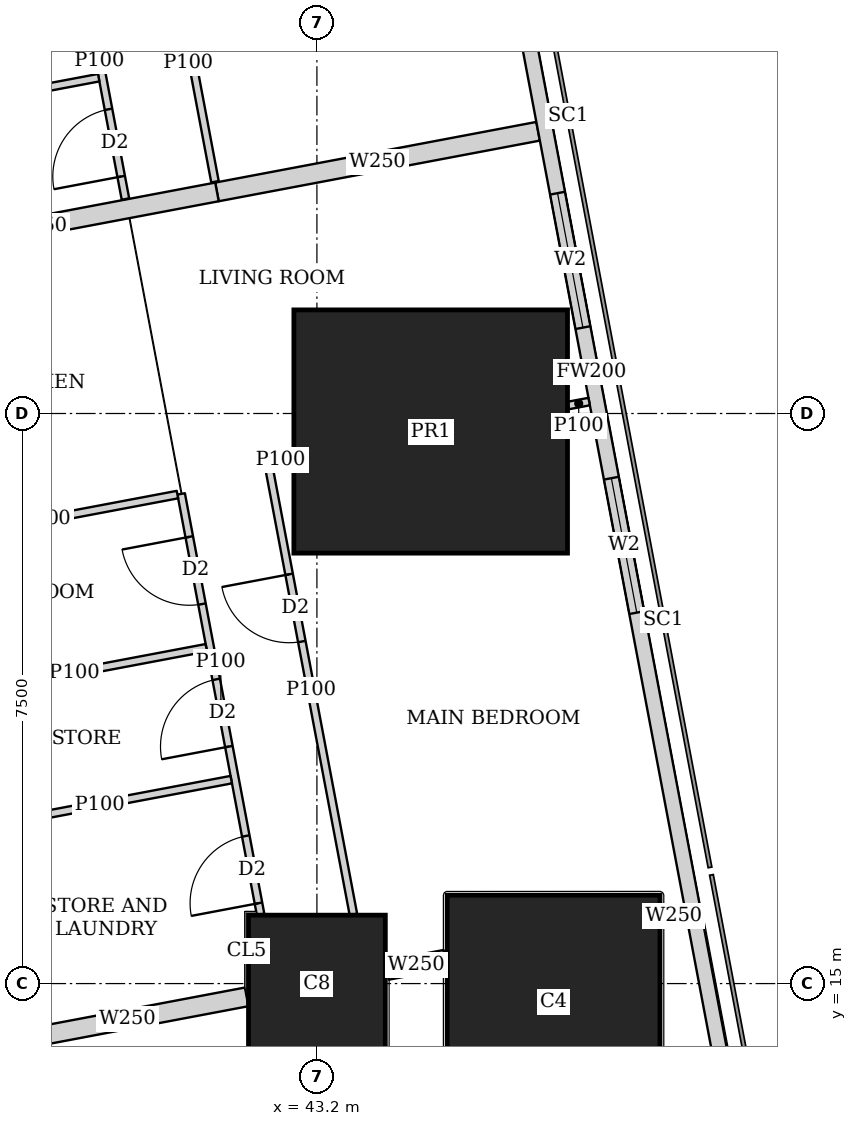
"""IFC4 building model, lengths in metres.
Left out: names, types, materials, properties, quantities, classifications, styles, units other than length and angle.
Written with IfcOpenShell. Run it as: python <this file> out.ifc"""

import sys

from ifc_helpers import new_model, si_unit, direction, frame, frame_2d, origin, origin_2d, place, context, subcontext, project, spatial, rectangle, extrude, element, fill, save


model = new_model("IFC4")
c1 = context("Model", 3, precision=1e-05, world=origin(), true_north=direction((0.0, 1.0)))
c2 = subcontext(c1, "Body", "Model", "MODEL_VIEW")
j1 = project(units=[si_unit("LENGTHUNIT", "METRE"), si_unit("PLANEANGLEUNIT", "RADIAN")], contexts=[c1])
p1 = place(None, origin())
s1 = spatial("IfcSite", under=j1, at=p1, CompositionType="ELEMENT")
p2 = place(p1, origin())
s2 = spatial("IfcBuilding", under=s1, at=p2, CompositionType="ELEMENT")
p3 = place(p2, frame((0.0, 0.0, 42.5)))
s3 = spatial("IfcBuildingStorey", under=s2, at=p3, CompositionType="ELEMENT", Elevation=42.5)
p4 = place(p3, frame((43.2, 15.0, 0.0), z_axis=(0.0, 0.0, 1.0), x_axis=(1.0, 0.0, 0.0)))
e1 = element("IfcColumn", 1, at=p4, inside=s3, PredefinedType="COLUMN", context=c2, shape_type="SweptSolid", body=[
    extrude(rectangle(XDim=1.8, YDim=1.8, at=origin_2d()), origin(), (0.0, 0.0, 1.0), 3.75),
])
p5 = place(p3, frame((46.314, 14.763, 0.0), z_axis=(0.0, 0.0, 1.0), x_axis=(1.0, 0.0, 0.0)))
e2 = element("IfcColumn", 2, at=p5, inside=s3, PredefinedType="COLUMN", context=c2, shape_type="SweptSolid", body=[
    extrude(rectangle(XDim=2.8, YDim=2.8, at=origin_2d()), origin(), (0.0, 0.0, 1.0), 3.75),
])
p6 = place(p3, frame((44.697, 22.263, 0.0), z_axis=(0.0, 0.0, 1.0), x_axis=(1.0, 0.0, 0.0)))
e3 = element("IfcColumn", 3, at=p6, inside=s3, PredefinedType="COLUMN", context=c2, shape_type="SweptSolid", body=[
    extrude(rectangle(XDim=3.6, YDim=3.2, at=origin_2d()), origin(), (0.0, 0.0, 1.0), 3.75),
])
p7 = place(p3, frame((50.653, 2.703, 0.0), z_axis=(0.0, 0.0, 1.0), x_axis=(-0.185612026696, 0.982623109613, 0.0)))
e4 = element("IfcWall", 4, at=p7, inside=s3, PredefinedType="SOLIDWALL", context=c2, shape_type="SweptSolid", body=[
    extrude(rectangle(XDim=41.393, YDim=0.2, at=frame_2d((20.697, 0.0))), origin(), (0.0, 0.0, 1.0), 3.5),
])
p8 = place(p7, frame((1.633, 0.0, 0.9)))
e5 = element("IfcOpeningElement", 5, at=p8, cuts=e4, PredefinedType="OPENING", context=c2, shape_type="SweptSolid", body=[
    extrude(rectangle(XDim=1.8, YDim=1.5, at=frame_2d((0.9, 0.75))), frame((0.0, 0.11, 0.0), z_axis=(0.0, -1.0, 0.0), x_axis=(1.0, 0.0, 0.0)), (0.0, 0.0, 1.0), 0.22),
])
p9 = place(p7, frame((6.032, 0.0, 0.9)))
e6 = element("IfcOpeningElement", 6, at=p9, cuts=e4, PredefinedType="OPENING", context=c2, shape_type="SweptSolid", body=[
    extrude(rectangle(XDim=1.8, YDim=1.5, at=frame_2d((0.9, 0.75))), frame((0.0, 0.11, 0.0), z_axis=(0.0, -1.0, 0.0), x_axis=(1.0, 0.0, 0.0)), (0.0, 0.0, 1.0), 0.22),
])
p10 = place(p7, frame((9.848, 0.0, 0.9)))
e7 = element("IfcOpeningElement", 7, at=p10, cuts=e4, PredefinedType="OPENING", context=c2, shape_type="SweptSolid", body=[
    extrude(rectangle(XDim=1.8, YDim=1.5, at=frame_2d((0.9, 0.75))), frame((0.0, 0.11, 0.0), z_axis=(0.0, -1.0, 0.0), x_axis=(1.0, 0.0, 0.0)), (0.0, 0.0, 1.0), 0.22),
])
p11 = place(p7, frame((17.481, 0.0, 0.9)))
e8 = element("IfcOpeningElement", 8, at=p11, cuts=e4, PredefinedType="OPENING", context=c2, shape_type="SweptSolid", body=[
    extrude(rectangle(XDim=1.8, YDim=1.5, at=frame_2d((0.9, 0.75))), frame((0.0, 0.11, 0.0), z_axis=(0.0, -1.0, 0.0), x_axis=(1.0, 0.0, 0.0)), (0.0, 0.0, 1.0), 0.22),
])
p12 = place(p7, frame((21.297, 0.0, 0.9)))
e9 = element("IfcOpeningElement", 9, at=p12, cuts=e4, PredefinedType="OPENING", context=c2, shape_type="SweptSolid", body=[
    extrude(rectangle(XDim=1.8, YDim=1.5, at=frame_2d((0.9, 0.75))), frame((0.0, 0.11, 0.0), z_axis=(0.0, -1.0, 0.0), x_axis=(1.0, 0.0, 0.0)), (0.0, 0.0, 1.0), 0.22),
])
p13 = place(p7, frame((25.113, 0.0, 0.9)))
e10 = element("IfcOpeningElement", 10, at=p13, cuts=e4, PredefinedType="OPENING", context=c2, shape_type="SweptSolid", body=[
    extrude(rectangle(XDim=1.8, YDim=1.5, at=frame_2d((0.9, 0.75))), frame((0.0, 0.11, 0.0), z_axis=(0.0, -1.0, 0.0), x_axis=(1.0, 0.0, 0.0)), (0.0, 0.0, 1.0), 0.22),
])
p14 = place(p7, frame((28.93, 0.0, 0.9)))
e11 = element("IfcOpeningElement", 11, at=p14, cuts=e4, PredefinedType="OPENING", context=c2, shape_type="SweptSolid", body=[
    extrude(rectangle(XDim=1.8, YDim=1.5, at=frame_2d((0.9, 0.75))), frame((0.0, 0.11, 0.0), z_axis=(0.0, -1.0, 0.0), x_axis=(1.0, 0.0, 0.0)), (0.0, 0.0, 1.0), 0.22),
])
p15 = place(p7, frame((32.746, 0.0, 0.9)))
e12 = element("IfcOpeningElement", 12, at=p15, cuts=e4, PredefinedType="OPENING", context=c2, shape_type="SweptSolid", body=[
    extrude(rectangle(XDim=1.8, YDim=1.5, at=frame_2d((0.9, 0.75))), frame((0.0, 0.11, 0.0), z_axis=(0.0, -1.0, 0.0), x_axis=(1.0, 0.0, 0.0)), (0.0, 0.0, 1.0), 0.22),
])
p16 = place(p7, frame((36.481, 0.0, 0.9)))
e13 = element("IfcOpeningElement", 13, at=p16, cuts=e4, PredefinedType="OPENING", context=c2, shape_type="SweptSolid", body=[
    extrude(rectangle(XDim=1.8, YDim=1.5, at=frame_2d((0.9, 0.75))), frame((0.0, 0.11, 0.0), z_axis=(0.0, -1.0, 0.0), x_axis=(1.0, 0.0, 0.0)), (0.0, 0.0, 1.0), 0.22),
])
p17 = place(p3, frame((33.68, 42.723, 0.0), z_axis=(0.0, 0.0, 1.0), x_axis=(0.185624129307, -0.98262082342, 0.0)))
e14 = element("IfcWall", 14, at=p17, inside=s3, PredefinedType="SOLIDWALL", context=c2, shape_type="SweptSolid", body=[
    extrude(rectangle(XDim=41.051, YDim=0.15, at=frame_2d((20.526, 0.0))), origin(), (0.0, 0.0, 1.0), 2.5),
])
p18 = place(p17, frame((7.73, 0.0, 0.0)))
e15 = element("IfcOpeningElement", 15, at=p18, cuts=e14, PredefinedType="OPENING", context=c2, shape_type="SweptSolid", body=[
    extrude(rectangle(XDim=1.0, YDim=2.1, at=frame_2d((0.5, 1.05))), frame((0.0, 0.085, 0.0), z_axis=(0.0, -1.0, 0.0), x_axis=(1.0, 0.0, 0.0)), (0.0, 0.0, 1.0), 0.17),
])
p19 = place(p17, frame((12.307, 0.0, 0.0)))
e16 = element("IfcOpeningElement", 16, at=p19, cuts=e14, PredefinedType="OPENING", context=c2, shape_type="SweptSolid", body=[
    extrude(rectangle(XDim=1.0, YDim=2.1, at=frame_2d((0.5, 1.05))), frame((0.0, 0.085, 0.0), z_axis=(0.0, -1.0, 0.0), x_axis=(1.0, 0.0, 0.0)), (0.0, 0.0, 1.0), 0.17),
])
p20 = place(p17, frame((19.938, 0.0, 0.0)))
e17 = element("IfcOpeningElement", 17, at=p20, cuts=e14, PredefinedType="OPENING", context=c2, shape_type="SweptSolid", body=[
    extrude(rectangle(XDim=1.0, YDim=2.1, at=frame_2d((0.5, 1.05))), frame((0.0, 0.085, 0.0), z_axis=(0.0, -1.0, 0.0), x_axis=(1.0, 0.0, 0.0)), (0.0, 0.0, 1.0), 0.17),
])
p21 = place(p17, frame((32.193, 0.0, 0.0)))
e18 = element("IfcOpeningElement", 18, at=p21, cuts=e14, PredefinedType="OPENING", context=c2, shape_type="SweptSolid", body=[
    extrude(rectangle(XDim=1.0, YDim=2.1, at=frame_2d((0.5, 1.05))), frame((0.0, 0.085, 0.0), z_axis=(0.0, -1.0, 0.0), x_axis=(1.0, 0.0, 0.0)), (0.0, 0.0, 1.0), 0.17),
])
p22 = place(p3, frame((41.156, 29.273, 0.0), z_axis=(0.0, 0.0, 1.0), x_axis=(0.185474762472, -0.982649028131, 0.0)))
e19 = element("IfcWall", 19, at=p22, inside=s3, PredefinedType="PARTITIONING", context=c2, shape_type="SweptSolid", body=[
    extrude(rectangle(XDim=3.79, YDim=0.1, at=frame_2d((1.895, 0.0))), origin(), (0.0, 0.0, 1.0), 2.5),
])
p23 = place(p22, frame((1.2, 0.0, 0.0)))
e20 = element("IfcOpeningElement", 20, at=p23, cuts=e19, PredefinedType="OPENING", context=c2, shape_type="SweptSolid", body=[
    extrude(rectangle(XDim=0.9, YDim=2.1, at=frame_2d((0.45, 1.05))), frame((0.0, 0.06, 0.0), z_axis=(0.0, -1.0, 0.0), x_axis=(1.0, 0.0, 0.0)), (0.0, 0.0, 1.0), 0.12),
])
p24 = place(p3, frame((39.997, 28.942, 0.0), z_axis=(0.0, 0.0, 1.0), x_axis=(0.185580474845, -0.982629069057, 0.0)))
e21 = element("IfcWall", 21, at=p24, inside=s3, PredefinedType="PARTITIONING", context=c2, shape_type="SweptSolid", body=[
    extrude(rectangle(XDim=3.685, YDim=0.1, at=frame_2d((1.842, 0.0))), origin(), (0.0, 0.0, 1.0), 3.5),
])
p25 = place(p24, frame((0.576, 0.0, 0.0)))
e22 = element("IfcOpeningElement", 22, at=p25, cuts=e21, PredefinedType="OPENING", context=c2, shape_type="SweptSolid", body=[
    extrude(rectangle(XDim=0.9, YDim=2.1, at=frame_2d((0.45, 1.05))), frame((0.0, 0.06, 0.0), z_axis=(0.0, -1.0, 0.0), x_axis=(1.0, 0.0, 0.0)), (0.0, 0.0, 1.0), 0.12),
])
p26 = place(p24, frame((2.483, 0.0, 0.0)))
e23 = element("IfcOpeningElement", 23, at=p26, cuts=e21, PredefinedType="OPENING", context=c2, shape_type="SweptSolid", body=[
    extrude(rectangle(XDim=0.9, YDim=2.1, at=frame_2d((0.45, 1.05))), frame((0.0, 0.06, 0.0), z_axis=(0.0, -1.0, 0.0), x_axis=(1.0, 0.0, 0.0)), (0.0, 0.0, 1.0), 0.12),
])
p27 = place(p3, frame((40.329, 26.918, 0.0), z_axis=(0.0, 0.0, 1.0), x_axis=(-0.982638553676, -0.185530247748, 0.0)))
e24 = element("IfcWall", 24, at=p27, inside=s3, PredefinedType="PARTITIONING", context=c2, shape_type="SweptSolid", body=[
    extrude(rectangle(XDim=3.525, YDim=0.1, at=frame_2d((1.763, 0.0))), origin(), (0.0, 0.0, 1.0), 3.5),
])
p28 = place(p3, frame((42.565, 21.809, 0.0), z_axis=(0.0, 0.0, 1.0), x_axis=(0.185719768524, -0.982602751665, 0.0)))
e25 = element("IfcWall", 25, at=p28, inside=s3, PredefinedType="PARTITIONING", context=c2, shape_type="SweptSolid", body=[
    extrude(rectangle(XDim=6.004, YDim=0.1, at=frame_2d((3.002, 0.0))), origin(), (0.0, 0.0, 1.0), 2.5),
])
p29 = place(p28, frame((1.45, 0.0, 0.0)))
e26 = element("IfcOpeningElement", 26, at=p29, cuts=e25, PredefinedType="OPENING", context=c2, shape_type="SweptSolid", body=[
    extrude(rectangle(XDim=0.9, YDim=2.1, at=frame_2d((0.45, 1.05))), frame((0.0, 0.06, 0.0), z_axis=(0.0, -1.0, 0.0), x_axis=(1.0, 0.0, 0.0)), (0.0, 0.0, 1.0), 0.12),
])
p30 = place(p3, frame((41.414, 21.442, 0.0), z_axis=(0.0, 0.0, 1.0), x_axis=(0.185605379031, -0.982624365297, 0.0)))
e27 = element("IfcWall", 27, at=p30, inside=s3, PredefinedType="PARTITIONING", context=c2, shape_type="SweptSolid", body=[
    extrude(rectangle(XDim=5.63, YDim=0.1, at=frame_2d((2.815, 0.0))), origin(), (0.0, 0.0, 1.0), 3.5),
])
p31 = place(p30, frame((0.575, 0.0, 0.0)))
e28 = element("IfcOpeningElement", 28, at=p31, cuts=e27, PredefinedType="OPENING", context=c2, shape_type="SweptSolid", body=[
    extrude(rectangle(XDim=0.9, YDim=2.1, at=frame_2d((0.45, 1.05))), frame((0.0, 0.06, 0.0), z_axis=(0.0, -1.0, 0.0), x_axis=(1.0, 0.0, 0.0)), (0.0, 0.0, 1.0), 0.12),
])
p32 = place(p30, frame((4.58, 0.0, 0.0)))
e29 = element("IfcOpeningElement", 29, at=p32, cuts=e27, PredefinedType="OPENING", context=c2, shape_type="SweptSolid", body=[
    extrude(rectangle(XDim=0.9, YDim=2.1, at=frame_2d((0.45, 1.05))), frame((0.0, 0.06, 0.0), z_axis=(0.0, -1.0, 0.0), x_axis=(1.0, 0.0, 0.0)), (0.0, 0.0, 1.0), 0.12),
])
p33 = place(p30, frame((2.483, 0.0, 0.0)))
e30 = element("IfcOpeningElement", 30, at=p33, cuts=e27, PredefinedType="OPENING", context=c2, shape_type="SweptSolid", body=[
    extrude(rectangle(XDim=0.9, YDim=2.1, at=frame_2d((0.45, 1.05))), frame((0.0, 0.06, 0.0), z_axis=(0.0, -1.0, 0.0), x_axis=(1.0, 0.0, 0.0)), (0.0, 0.0, 1.0), 0.12),
])
p34 = place(p3, frame((46.782, 22.657, 0.0), z_axis=(0.0, 0.0, 1.0), x_axis=(-0.982574553168, -0.185868898601, 0.0)))
e31 = element("IfcWall", 31, at=p34, inside=s3, PredefinedType="PARTITIONING", context=c2, shape_type="SweptSolid", body=[
    extrude(rectangle(XDim=0.28, YDim=0.1, at=frame_2d((0.14, 0.0))), origin(), (0.0, 0.0, 1.0), 3.5),
])
p35 = place(p3, frame((42.887, 21.921, 0.0), z_axis=(0.0, 0.0, 1.0), x_axis=(-0.982274918032, -0.187445953293, 0.0)))
e32 = element("IfcWall", 32, at=p35, inside=s3, PredefinedType="PARTITIONING", context=c2, shape_type="SweptSolid", body=[
    extrude(rectangle(XDim=0.336, YDim=0.1, at=frame_2d((0.168, 0.0))), origin(), (0.0, 0.0, 1.0), 2.5),
])
p36 = place(p3, frame((41.365, 21.433, 0.0), z_axis=(0.0, 0.0, 1.0), x_axis=(-0.982638553676, -0.185530247748, 0.0)))
e33 = element("IfcWall", 33, at=p36, inside=s3, PredefinedType="PARTITIONING", context=c2, shape_type="SweptSolid", body=[
    extrude(rectangle(XDim=3.525, YDim=0.1, at=frame_2d((1.763, 0.0))), origin(), (0.0, 0.0, 1.0), 3.5),
])
p37 = place(p3, frame((42.073, 17.683, 0.0), z_axis=(0.0, 0.0, 1.0), x_axis=(-0.982626628545, -0.185593396635, 0.0)))
e34 = element("IfcWall", 34, at=p37, inside=s3, PredefinedType="PARTITIONING", context=c2, shape_type="SweptSolid", body=[
    extrude(rectangle(XDim=3.524, YDim=0.1, at=frame_2d((1.762, 0.0))), origin(), (0.0, 0.0, 1.0), 3.5),
])
p38 = place(p3, frame((41.745, 19.418, 0.0), z_axis=(0.0, 0.0, 1.0), x_axis=(-0.982629014545, -0.18558076348, 0.0)))
e35 = element("IfcWall", 35, at=p38, inside=s3, PredefinedType="PARTITIONING", context=c2, shape_type="SweptSolid", body=[
    extrude(rectangle(XDim=3.524, YDim=0.1, at=frame_2d((1.762, 0.0))), origin(), (0.0, 0.0, 1.0), 3.5),
])
p39 = place(p3, frame((46.11, 26.213, 0.0), z_axis=(0.0, 0.0, 1.0), x_axis=(-0.982633535512, -0.185556823879, 0.0)))
e36 = element("IfcWall", 36, at=p39, inside=s3, PredefinedType="SOLIDWALL", context=c2, shape_type="SweptSolid", body=[
    extrude(rectangle(XDim=4.3, YDim=0.25, at=frame_2d((2.15, 0.0))), origin(), (0.0, 0.0, 1.0), 2.05),
])
p40 = place(p3, frame((41.885, 25.415, 0.0), z_axis=(0.0, 0.0, 1.0), x_axis=(-0.982596737686, -0.185751584349, 0.0)))
e37 = element("IfcWall", 37, at=p40, inside=s3, PredefinedType="SOLIDWALL", context=c2, shape_type="SweptSolid", body=[
    extrude(rectangle(XDim=4.775, YDim=0.25, at=frame_2d((2.387, 0.0))), origin(), (0.0, 0.0, 1.0), 3.5),
])
p41 = place(p3, frame((48.055, 15.917, 0.0), z_axis=(0.0, 0.0, 1.0), x_axis=(-0.982510408223, -0.186207673669, 0.0)))
e38 = element("IfcWall", 38, at=p41, inside=s3, PredefinedType="SOLIDWALL", context=c2, shape_type="SweptSolid", body=[
    extrude(rectangle(XDim=0.323, YDim=0.25, at=frame_2d((0.161, 0.0))), origin(), (0.0, 0.0, 1.0), 3.5),
])
p42 = place(p3, frame((44.89, 15.319, 0.0), z_axis=(0.0, 0.0, 1.0), x_axis=(-0.982540856152, -0.186046945666, 0.0)))
e39 = element("IfcWall", 39, at=p42, inside=s3, PredefinedType="SOLIDWALL", context=c2, shape_type="SweptSolid", body=[
    extrude(rectangle(XDim=0.78, YDim=0.25, at=frame_2d((0.39, 0.0))), origin(), (0.0, 0.0, 1.0), 2.05),
])
p43 = place(p3, frame((42.276, 14.825, 0.0), z_axis=(0.0, 0.0, 1.0), x_axis=(-0.982607211054, -0.185696173318, 0.0)))
e40 = element("IfcWall", 40, at=p43, inside=s3, PredefinedType="SOLIDWALL", context=c2, shape_type="SweptSolid", body=[
    extrude(rectangle(XDim=3.194, YDim=0.25, at=frame_2d((1.597, 0.0))), origin(), (0.0, 0.0, 1.0), 3.5),
])
p44 = place(p11, origin())
e41 = element("IfcWindow", 41, at=p44, inside=s3, PartitioningType="SINGLE_PANEL", PredefinedType="WINDOW", context=c2, shape_type="SweptSolid", body=[
    extrude(rectangle(XDim=1.8, YDim=1.5, at=frame_2d((0.9, 0.75))), frame((0.0, 0.03, 0.0), z_axis=(0.0, -1.0, 0.0), x_axis=(1.0, 0.0, 0.0)), (0.0, 0.0, 1.0), 0.06),
])
fill(e8, e41)
p45 = place(p12, origin())
e42 = element("IfcWindow", 42, at=p45, inside=s3, PartitioningType="SINGLE_PANEL", PredefinedType="WINDOW", context=c2, shape_type="SweptSolid", body=[
    extrude(rectangle(XDim=1.8, YDim=1.5, at=frame_2d((0.9, 0.75))), frame((0.0, 0.03, 0.0), z_axis=(0.0, -1.0, 0.0), x_axis=(1.0, 0.0, 0.0)), (0.0, 0.0, 1.0), 0.06),
])
fill(e9, e42)
p46 = place(p23, origin())
e43 = element("IfcDoor", 43, at=p46, inside=s3, OperationType="SINGLE_SWING_LEFT", PredefinedType="DOOR", context=c2, shape_type="SweptSolid", body=[
    extrude(rectangle(XDim=0.9, YDim=2.1, at=frame_2d((0.45, 1.05))), frame((0.0, 0.025, 0.0), z_axis=(0.0, -1.0, 0.0), x_axis=(1.0, 0.0, 0.0)), (0.0, 0.0, 1.0), 0.05),
])
fill(e20, e43)
p47 = place(p26, origin())
e44 = element("IfcDoor", 44, at=p47, inside=s3, OperationType="SINGLE_SWING_LEFT", PredefinedType="DOOR", context=c2, shape_type="SweptSolid", body=[
    extrude(rectangle(XDim=0.9, YDim=2.1, at=frame_2d((0.45, 1.05))), frame((0.0, 0.025, 0.0), z_axis=(0.0, -1.0, 0.0), x_axis=(1.0, 0.0, 0.0)), (0.0, 0.0, 1.0), 0.05),
])
fill(e23, e44)
p48 = place(p29, origin())
e45 = element("IfcDoor", 45, at=p48, inside=s3, OperationType="SINGLE_SWING_RIGHT", PredefinedType="DOOR", context=c2, shape_type="SweptSolid", body=[
    extrude(rectangle(XDim=0.9, YDim=2.1, at=frame_2d((0.45, 1.05))), frame((0.0, 0.025, 0.0), z_axis=(0.0, -1.0, 0.0), x_axis=(1.0, 0.0, 0.0)), (0.0, 0.0, 1.0), 0.05),
])
fill(e26, e45)
p49 = place(p31, origin())
e46 = element("IfcDoor", 46, at=p49, inside=s3, OperationType="SINGLE_SWING_RIGHT", PredefinedType="DOOR", context=c2, shape_type="SweptSolid", body=[
    extrude(rectangle(XDim=0.9, YDim=2.1, at=frame_2d((0.45, 1.05))), frame((0.0, 0.025, 0.0), z_axis=(0.0, -1.0, 0.0), x_axis=(1.0, 0.0, 0.0)), (0.0, 0.0, 1.0), 0.05),
])
fill(e28, e46)
p50 = place(p32, origin())
e47 = element("IfcDoor", 47, at=p50, inside=s3, OperationType="SINGLE_SWING_LEFT", PredefinedType="DOOR", context=c2, shape_type="SweptSolid", body=[
    extrude(rectangle(XDim=0.9, YDim=2.1, at=frame_2d((0.45, 1.05))), frame((0.0, 0.025, 0.0), z_axis=(0.0, -1.0, 0.0), x_axis=(1.0, 0.0, 0.0)), (0.0, 0.0, 1.0), 0.05),
])
fill(e29, e47)
p51 = place(p33, origin())
e48 = element("IfcDoor", 48, at=p51, inside=s3, OperationType="SINGLE_SWING_LEFT", PredefinedType="DOOR", context=c2, shape_type="SweptSolid", body=[
    extrude(rectangle(XDim=0.9, YDim=2.1, at=frame_2d((0.45, 1.05))), frame((0.0, 0.025, 0.0), z_axis=(0.0, -1.0, 0.0), x_axis=(1.0, 0.0, 0.0)), (0.0, 0.0, 1.0), 0.05),
])
fill(e30, e48)
save(model, sys.argv[1])
